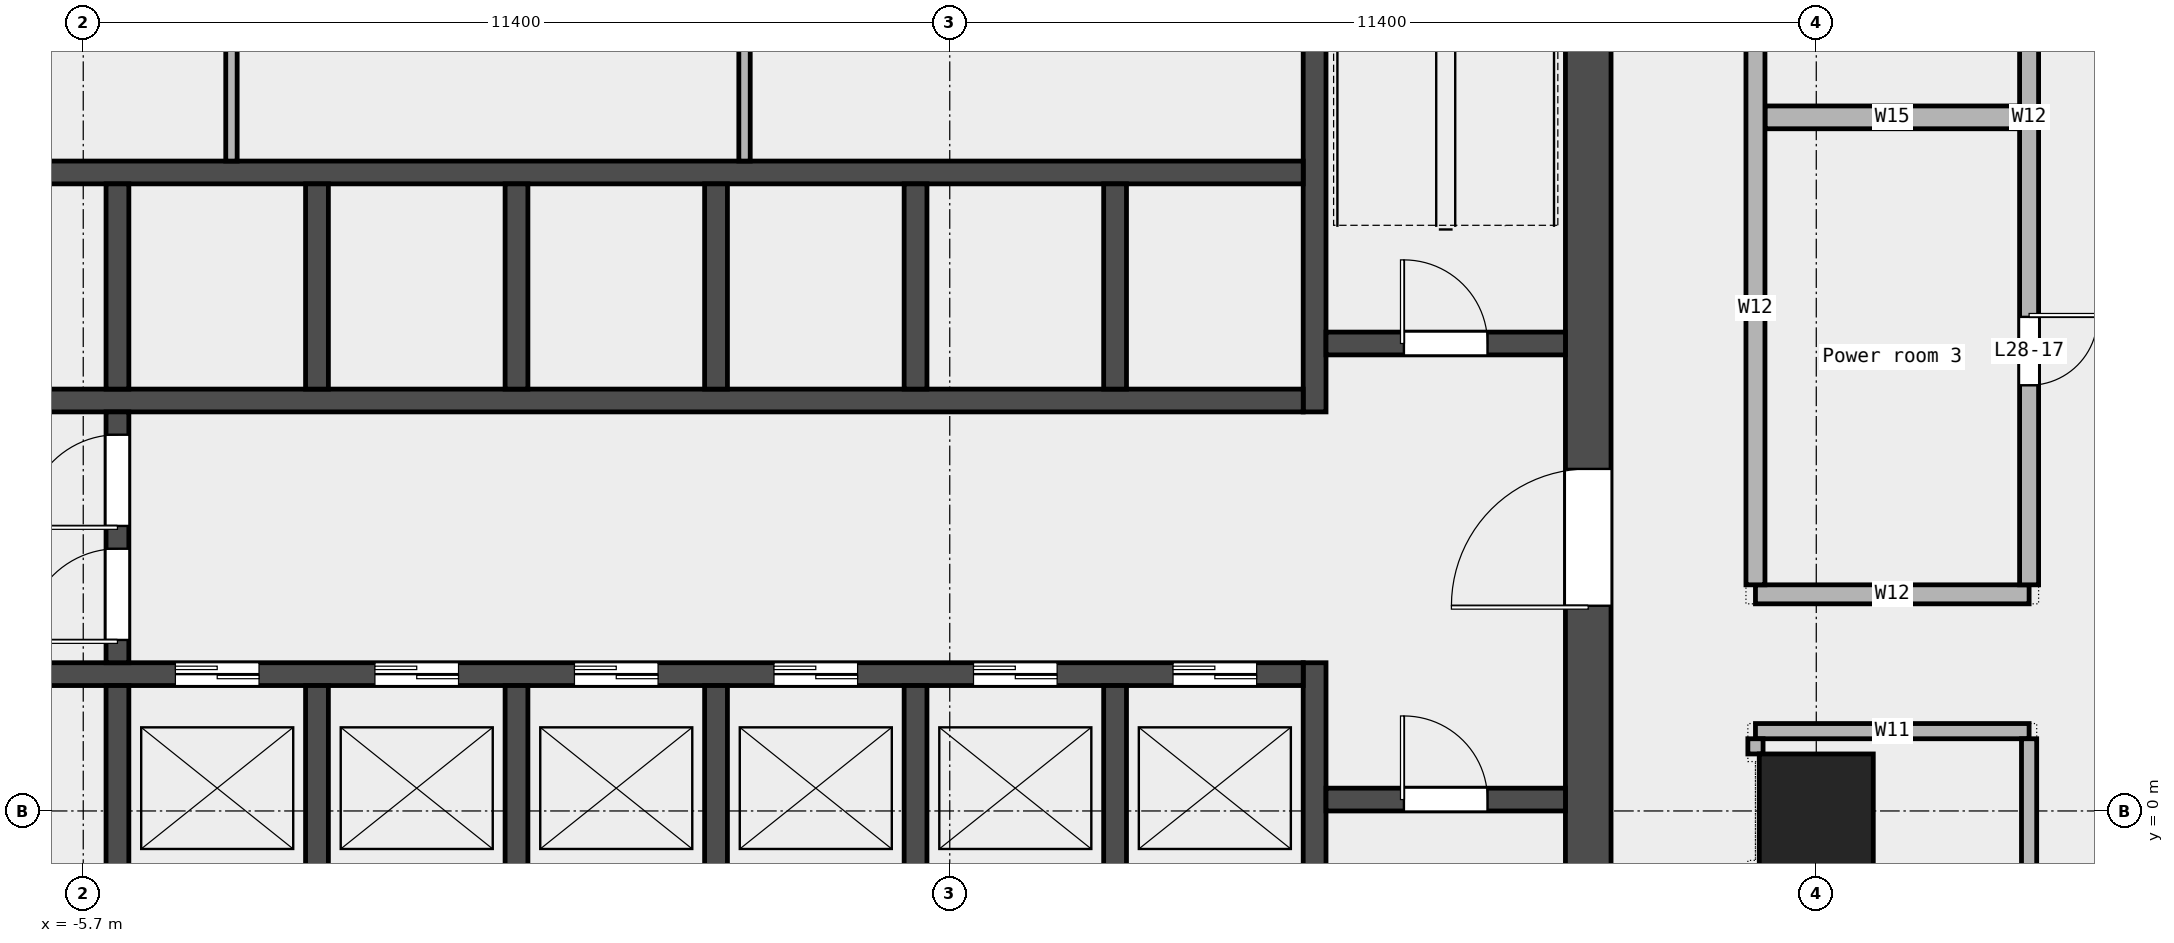
"""IFC4 building model, lengths in metres.
Left out: names, types, materials, properties, quantities, classifications, styles, units other than length and angle.
Written with IfcOpenShell. Run it as: python <this file> out.ifc"""

import sys

from ifc_helpers import new_model, si_unit, direction, frame, frame_2d, origin, origin_2d, place, context, subcontext, project, spatial, rectangle, extrude, element, fill, save


model = new_model("IFC4")
c1 = context("Model", 3, precision=1e-05, world=origin(), true_north=direction((0.0, 1.0)))
c2 = subcontext(c1, "Body", "Model", "MODEL_VIEW")
j1 = project(units=[si_unit("LENGTHUNIT", "METRE"), si_unit("PLANEANGLEUNIT", "RADIAN")], contexts=[c1])
p1 = place(None, origin())
s1 = spatial("IfcSite", under=j1, at=p1, CompositionType="ELEMENT")
p2 = place(p1, origin())
s2 = spatial("IfcBuilding", under=s1, at=p2, CompositionType="ELEMENT")
p3 = place(p2, frame((0.0, 0.0, 139.6)))
s3 = spatial("IfcBuildingStorey", under=s2, at=p3, CompositionType="ELEMENT", Elevation=139.6)
p4 = place(p3, frame((17.1, 0.0, 0.0), z_axis=(0.0, 0.0, 1.0), x_axis=(1.0, 0.0, 0.0)))
e1 = element("IfcColumn", 1, at=p4, inside=s3, PredefinedType="COLUMN", context=c2, shape_type="SweptSolid", body=[
    extrude(rectangle(XDim=1.5, YDim=1.5, at=origin_2d()), origin(), (0.0, 0.0, 1.0), 4.05),
])
p5 = place(p3, frame((16.3, 1.05, 0.0), z_axis=(0.0, 0.0, 1.0), x_axis=(1.0, 0.0, 0.0)))
e2 = element("IfcWall", 2, at=p5, inside=s3, PredefinedType="PARTITIONING", context=c2, shape_type="SweptSolid", body=[
    extrude(rectangle(XDim=3.6, YDim=0.2, at=frame_2d((1.8, 0.0))), origin(), (0.0, 0.0, 1.0), 4.05),
])
p6 = place(p3, frame((16.3, 2.85, 0.0), z_axis=(0.0, 0.0, 1.0), x_axis=(1.0, 0.0, 0.0)))
e3 = element("IfcWall", 3, at=p6, inside=s3, PredefinedType="PARTITIONING", context=c2, shape_type="SweptSolid", body=[
    extrude(rectangle(XDim=3.6, YDim=0.25, at=frame_2d((1.8, 0.0))), origin(), (0.0, 0.0, 1.0), 4.05),
])
p7 = place(p3, frame((16.425, 9.125, 0.0), z_axis=(0.0, 0.0, 1.0), x_axis=(1.0, 0.0, 0.0)))
e4 = element("IfcWall", 4, at=p7, inside=s3, PredefinedType="PARTITIONING", context=c2, shape_type="SweptSolid", body=[
    extrude(rectangle(XDim=3.35, YDim=0.3, at=frame_2d((1.675, 0.0))), origin(), (0.0, 0.0, 1.0), 4.05),
])
p8 = place(p3, frame((16.3, 0.75, 0.0), z_axis=(0.0, 0.0, 1.0), x_axis=(0.0, 1.0, 0.0)))
e5 = element("IfcWall", 5, at=p8, inside=s3, PredefinedType="PARTITIONING", context=c2, shape_type="SweptSolid", body=[
    extrude(rectangle(XDim=0.2, YDim=0.2, at=frame_2d((0.1, 0.0))), origin(), (0.0, 0.0, 1.0), 4.05),
])
p9 = place(p3, frame((16.3, 2.975, 0.0), z_axis=(0.0, 0.0, 1.0), x_axis=(0.0, 1.0, 0.0)))
e6 = element("IfcWall", 6, at=p9, inside=s3, PredefinedType="PARTITIONING", context=c2, shape_type="SweptSolid", body=[
    extrude(rectangle(XDim=7.275, YDim=0.25, at=frame_2d((3.637, 0.0))), origin(), (0.0, 0.0, 1.0), 4.05),
])
p10 = place(p3, frame((19.9, -9.0, 0.0), z_axis=(0.0, 0.0, 1.0), x_axis=(0.0, 1.0, 0.0)))
e7 = element("IfcWall", 7, at=p10, inside=s3, PredefinedType="PARTITIONING", context=c2, shape_type="SweptSolid", body=[
    extrude(rectangle(XDim=9.95, YDim=0.2, at=frame_2d((4.975, 0.0))), origin(), (0.0, 0.0, 1.0), 4.05),
])
p11 = place(p3, frame((19.9, 2.975, 0.0), z_axis=(0.0, 0.0, 1.0), x_axis=(0.0, 1.0, 0.0)))
e8 = element("IfcWall", 8, at=p11, inside=s3, PredefinedType="PARTITIONING", context=c2, shape_type="SweptSolid", body=[
    extrude(rectangle(XDim=12.3, YDim=0.25, at=frame_2d((6.15, 0.0))), origin(), (0.0, 0.0, 1.0), 4.05),
])
p12 = place(p11, frame((8.775, 0.0, 0.0)))
e9 = element("IfcOpeningElement", 9, at=p12, cuts=e8, PredefinedType="OPENING", context=c2, shape_type="SweptSolid", body=[
    extrude(rectangle(XDim=0.9, YDim=2.1, at=frame_2d((0.45, 1.05))), frame((0.0, 0.137, 0.0), z_axis=(0.0, -1.0, 0.0), x_axis=(1.0, 0.0, 0.0)), (0.0, 0.0, 1.0), 0.274),
])
p13 = place(p11, frame((2.625, 0.0, 0.0)))
e10 = element("IfcOpeningElement", 10, at=p13, cuts=e8, PredefinedType="OPENING", context=c2, shape_type="SweptSolid", body=[
    extrude(rectangle(XDim=0.9, YDim=2.1, at=frame_2d((0.45, 1.05))), frame((0.0, 0.137, 0.0), z_axis=(0.0, -1.0, 0.0), x_axis=(1.0, 0.0, 0.0)), (0.0, 0.0, 1.0), 0.274),
])
p14 = place(p3, frame((14.1, -6.6, 0.0), z_axis=(0.0, 0.0, 1.0), x_axis=(0.0, 1.0, 0.0)))
e11 = element("IfcWall", 11, at=p14, inside=s3, PredefinedType="SHEAR", context=c2, shape_type="SweptSolid", body=[
    extrude(rectangle(XDim=19.5, YDim=0.6, at=frame_2d((9.75, 0.0))), origin(), (0.0, 0.0, 1.0), 4.2),
])
p15 = place(p14, frame((9.3, 0.0, 0.0)))
e12 = element("IfcOpeningElement", 12, at=p15, cuts=e11, PredefinedType="OPENING", context=c2, shape_type="SweptSolid", body=[
    extrude(rectangle(XDim=1.8, YDim=2.1, at=frame_2d((0.9, 1.05))), frame((0.0, 0.312, 0.0), z_axis=(0.0, -1.0, 0.0), x_axis=(1.0, 0.0, 0.0)), (0.0, 0.0, 1.0), 0.624),
])
p16 = place(p3, frame((10.5, -6.6, 0.0), z_axis=(0.0, 0.0, 1.0), x_axis=(0.0, 1.0, 0.0)))
e13 = element("IfcWall", 13, at=p16, inside=s3, PredefinedType="SHEAR", context=c2, shape_type="SweptSolid", body=[
    extrude(rectangle(XDim=8.55, YDim=0.3, at=frame_2d((4.275, 0.0))), origin(), (0.0, 0.0, 1.0), 4.2),
])
p17 = place(p3, frame((10.5, 5.25, 0.0), z_axis=(0.0, 0.0, 1.0), x_axis=(0.0, 1.0, 0.0)))
e14 = element("IfcWall", 14, at=p17, inside=s3, PredefinedType="SHEAR", context=c2, shape_type="SweptSolid", body=[
    extrude(rectangle(XDim=7.65, YDim=0.3, at=frame_2d((3.825, 0.0))), origin(), (0.0, 0.0, 1.0), 4.2),
])
p18 = place(p3, frame((10.65, 0.15, 0.0), z_axis=(0.0, 0.0, 1.0), x_axis=(1.0, 0.0, 0.0)))
e15 = element("IfcWall", 15, at=p18, inside=s3, PredefinedType="SOLIDWALL", context=c2, shape_type="SweptSolid", body=[
    extrude(rectangle(XDim=3.15, YDim=0.3, at=frame_2d((1.575, 0.0))), origin(), (0.0, 0.0, 1.0), 4.2),
])
p19 = place(p18, frame((1.025, 0.0, 0.0)))
e16 = element("IfcOpeningElement", 16, at=p19, cuts=e15, PredefinedType="OPENING", context=c2, shape_type="SweptSolid", body=[
    extrude(rectangle(XDim=1.1, YDim=2.1, at=frame_2d((0.55, 1.05))), frame((0.0, 0.162, 0.0), z_axis=(0.0, -1.0, 0.0), x_axis=(1.0, 0.0, 0.0)), (0.0, 0.0, 1.0), 0.324),
])
p20 = place(p3, frame((10.65, 6.15, 0.0), z_axis=(0.0, 0.0, 1.0), x_axis=(1.0, 0.0, 0.0)))
e17 = element("IfcWall", 17, at=p20, inside=s3, PredefinedType="SOLIDWALL", context=c2, shape_type="SweptSolid", body=[
    extrude(rectangle(XDim=3.15, YDim=0.3, at=frame_2d((1.575, 0.0))), origin(), (0.0, 0.0, 1.0), 4.2),
])
p21 = place(p20, frame((1.025, 0.0, 0.0)))
e18 = element("IfcOpeningElement", 18, at=p21, cuts=e17, PredefinedType="OPENING", context=c2, shape_type="SweptSolid", body=[
    extrude(rectangle(XDim=1.1, YDim=2.1, at=frame_2d((0.55, 1.05))), frame((0.0, 0.162, 0.0), z_axis=(0.0, -1.0, 0.0), x_axis=(1.0, 0.0, 0.0)), (0.0, 0.0, 1.0), 0.324),
])
p22 = place(p3, frame((-10.35, 1.8, 0.0), z_axis=(0.0, 0.0, 1.0), x_axis=(1.0, 0.0, 0.0)))
e19 = element("IfcWall", 19, at=p22, inside=s3, PredefinedType="SOLIDWALL", context=c2, shape_type="SweptSolid", body=[
    extrude(rectangle(XDim=20.7, YDim=0.3, at=frame_2d((10.35, 0.0))), origin(), (0.0, 0.0, 1.0), 4.2),
])
p23 = place(p22, frame((0.512, 0.0, 0.0)))
e20 = element("IfcOpeningElement", 20, at=p23, cuts=e19, PredefinedType="OPENING", context=c2, shape_type="SweptSolid", body=[
    extrude(rectangle(XDim=1.3, YDim=2.1, at=frame_2d((0.65, 1.05))), frame((0.0, 0.162, 0.0), z_axis=(0.0, -1.0, 0.0), x_axis=(1.0, 0.0, 0.0)), (0.0, 0.0, 1.0), 0.324),
])
p24 = place(p22, frame((5.863, 0.0, 0.0)))
e21 = element("IfcOpeningElement", 21, at=p24, cuts=e19, PredefinedType="OPENING", context=c2, shape_type="SweptSolid", body=[
    extrude(rectangle(XDim=1.1, YDim=2.1, at=frame_2d((0.55, 1.05))), frame((0.0, 0.162, 0.0), z_axis=(0.0, -1.0, 0.0), x_axis=(1.0, 0.0, 0.0)), (0.0, 0.0, 1.0), 0.324),
])
p25 = place(p22, frame((8.488, 0.0, 0.0)))
e22 = element("IfcOpeningElement", 22, at=p25, cuts=e19, PredefinedType="OPENING", context=c2, shape_type="SweptSolid", body=[
    extrude(rectangle(XDim=1.1, YDim=2.1, at=frame_2d((0.55, 1.05))), frame((0.0, 0.162, 0.0), z_axis=(0.0, -1.0, 0.0), x_axis=(1.0, 0.0, 0.0)), (0.0, 0.0, 1.0), 0.324),
])
p26 = place(p22, frame((11.113, 0.0, 0.0)))
e23 = element("IfcOpeningElement", 23, at=p26, cuts=e19, PredefinedType="OPENING", context=c2, shape_type="SweptSolid", body=[
    extrude(rectangle(XDim=1.1, YDim=2.1, at=frame_2d((0.55, 1.05))), frame((0.0, 0.162, 0.0), z_axis=(0.0, -1.0, 0.0), x_axis=(1.0, 0.0, 0.0)), (0.0, 0.0, 1.0), 0.324),
])
p27 = place(p22, frame((13.738, 0.0, 0.0)))
e24 = element("IfcOpeningElement", 24, at=p27, cuts=e19, PredefinedType="OPENING", context=c2, shape_type="SweptSolid", body=[
    extrude(rectangle(XDim=1.1, YDim=2.1, at=frame_2d((0.55, 1.05))), frame((0.0, 0.162, 0.0), z_axis=(0.0, -1.0, 0.0), x_axis=(1.0, 0.0, 0.0)), (0.0, 0.0, 1.0), 0.324),
])
p28 = place(p22, frame((16.363, 0.0, 0.0)))
e25 = element("IfcOpeningElement", 25, at=p28, cuts=e19, PredefinedType="OPENING", context=c2, shape_type="SweptSolid", body=[
    extrude(rectangle(XDim=1.1, YDim=2.1, at=frame_2d((0.55, 1.05))), frame((0.0, 0.162, 0.0), z_axis=(0.0, -1.0, 0.0), x_axis=(1.0, 0.0, 0.0)), (0.0, 0.0, 1.0), 0.324),
])
p29 = place(p22, frame((18.988, 0.0, 0.0)))
e26 = element("IfcOpeningElement", 26, at=p29, cuts=e19, PredefinedType="OPENING", context=c2, shape_type="SweptSolid", body=[
    extrude(rectangle(XDim=1.1, YDim=2.1, at=frame_2d((0.55, 1.05))), frame((0.0, 0.162, 0.0), z_axis=(0.0, -1.0, 0.0), x_axis=(1.0, 0.0, 0.0)), (0.0, 0.0, 1.0), 0.324),
])
p30 = place(p3, frame((-10.35, 5.4, 0.0), z_axis=(0.0, 0.0, 1.0), x_axis=(1.0, 0.0, 0.0)))
e27 = element("IfcWall", 27, at=p30, inside=s3, PredefinedType="SOLIDWALL", context=c2, shape_type="SweptSolid", body=[
    extrude(rectangle(XDim=20.7, YDim=0.3, at=frame_2d((10.35, 0.0))), origin(), (0.0, 0.0, 1.0), 4.2),
])
p31 = place(p30, frame((0.512, 0.0, 0.0)))
e28 = element("IfcOpeningElement", 28, at=p31, cuts=e27, PredefinedType="OPENING", context=c2, shape_type="SweptSolid", body=[
    extrude(rectangle(XDim=1.3, YDim=2.1, at=frame_2d((0.65, 1.05))), frame((0.0, 0.162, 0.0), z_axis=(0.0, -1.0, 0.0), x_axis=(1.0, 0.0, 0.0)), (0.0, 0.0, 1.0), 0.324),
])
p32 = place(p3, frame((-10.35, 8.4, 0.0), z_axis=(0.0, 0.0, 1.0), x_axis=(1.0, 0.0, 0.0)))
e29 = element("IfcWall", 29, at=p32, inside=s3, PredefinedType="SOLIDWALL", context=c2, shape_type="SweptSolid", body=[
    extrude(rectangle(XDim=20.7, YDim=0.3, at=frame_2d((10.35, 0.0))), origin(), (0.0, 0.0, 1.0), 4.2),
])
for number, where, z_axis, x_axis in (
    (30, (-5.25, -1.05, 0.0), (0.0, 0.0, 1.0), (0.0, 1.0, 0.0)),
    (31, (-2.625, -1.05, 0.0), (0.0, 0.0, 1.0), (0.0, 1.0, 0.0)),
    (32, (0.0, -1.05, 0.0), (0.0, 0.0, 1.0), (0.0, 1.0, 0.0)),
    (33, (2.625, -1.05, 0.0), (0.0, 0.0, 1.0), (0.0, 1.0, 0.0)),
    (34, (5.25, -1.05, 0.0), (0.0, 0.0, 1.0), (0.0, 1.0, 0.0)),
    (35, (7.875, -1.05, 0.0), (0.0, 0.0, 1.0), (0.0, 1.0, 0.0)),
    (36, (-5.25, 5.55, 0.0), (0.0, 0.0, 1.0), (0.0, 1.0, 0.0)),
    (37, (-2.625, 5.55, 0.0), (0.0, 0.0, 1.0), (0.0, 1.0, 0.0)),
    (38, (0.0, 5.55, 0.0), (0.0, 0.0, 1.0), (0.0, 1.0, 0.0)),
    (39, (2.625, 5.55, 0.0), (0.0, 0.0, 1.0), (0.0, 1.0, 0.0)),
    (40, (5.25, 5.55, 0.0), (0.0, 0.0, 1.0), (0.0, 1.0, 0.0)),
    (41, (7.875, 5.55, 0.0), (0.0, 0.0, 1.0), (0.0, 1.0, 0.0)),
):
    element("IfcWall", number, at=place(p3, frame(where, z_axis=z_axis, x_axis=x_axis)), inside=s3, PredefinedType="SOLIDWALL", context=c2, shape_type="SweptSolid", body=[
        extrude(rectangle(XDim=2.7, YDim=0.3, at=frame_2d((1.35, 0.0))), origin(), (0.0, 0.0, 1.0), 4.2),
    ])
p33 = place(p3, frame((-5.25, 1.95, 0.0), z_axis=(0.0, 0.0, 1.0), x_axis=(0.0, 1.0, 0.0)))
e42 = element("IfcWall", 42, at=p33, inside=s3, PredefinedType="SOLIDWALL", context=c2, shape_type="SweptSolid", body=[
    extrude(rectangle(XDim=3.3, YDim=0.3, at=frame_2d((1.65, 0.0))), origin(), (0.0, 0.0, 1.0), 4.2),
])
p34 = place(p33, frame((0.3, 0.0, 0.0)))
e43 = element("IfcOpeningElement", 43, at=p34, cuts=e42, PredefinedType="OPENING", context=c2, shape_type="SweptSolid", body=[
    extrude(rectangle(XDim=1.2, YDim=2.1, at=frame_2d((0.6, 1.05))), frame((0.0, 0.162, 0.0), z_axis=(0.0, -1.0, 0.0), x_axis=(1.0, 0.0, 0.0)), (0.0, 0.0, 1.0), 0.324),
])
p35 = place(p33, frame((1.8, 0.0, 0.0)))
e44 = element("IfcOpeningElement", 44, at=p35, cuts=e42, PredefinedType="OPENING", context=c2, shape_type="SweptSolid", body=[
    extrude(rectangle(XDim=1.2, YDim=2.1, at=frame_2d((0.6, 1.05))), frame((0.0, 0.162, 0.0), z_axis=(0.0, -1.0, 0.0), x_axis=(1.0, 0.0, 0.0)), (0.0, 0.0, 1.0), 0.324),
])
for number, where, z_axis, x_axis in (
    (45, (-3.75, 8.55, 0.0), (0.0, 0.0, 1.0), (0.0, 1.0, 0.0)),
    (46, (3.0, 8.55, 0.0), (0.0, 0.0, 1.0), (0.0, 1.0, 0.0)),
):
    element("IfcWall", number, at=place(p3, frame(where, z_axis=z_axis, x_axis=x_axis)), inside=s3, PredefinedType="PARTITIONING", context=c2, shape_type="SweptSolid", body=[
        extrude(rectangle(XDim=4.35, YDim=0.15, at=frame_2d((2.175, 0.0))), origin(), (0.0, 0.0, 1.0), 4.2),
    ])
p36 = place(p13, origin())
e47 = element("IfcDoor", 47, at=p36, inside=s3, OperationType="SINGLE_SWING_LEFT", PredefinedType="DOOR", context=c2, shape_type="SweptSolid", body=[
    extrude(rectangle(XDim=0.9, YDim=2.1, at=frame_2d((0.45, 1.05))), frame((0.0, 0.025, 0.0), z_axis=(0.0, -1.0, 0.0), x_axis=(1.0, 0.0, 0.0)), (0.0, 0.0, 1.0), 0.05),
])
fill(e10, e47)
p37 = place(p19, origin())
e48 = element("IfcDoor", 48, at=p37, inside=s3, OperationType="SINGLE_SWING_RIGHT", PredefinedType="DOOR", context=c2, shape_type="SweptSolid", body=[
    extrude(rectangle(XDim=1.1, YDim=2.1, at=frame_2d((0.55, 1.05))), frame((0.0, 0.025, 0.0), z_axis=(0.0, -1.0, 0.0), x_axis=(1.0, 0.0, 0.0)), (0.0, 0.0, 1.0), 0.05),
])
fill(e16, e48)
p38 = place(p21, origin())
e49 = element("IfcDoor", 49, at=p38, inside=s3, OperationType="SINGLE_SWING_RIGHT", PredefinedType="DOOR", context=c2, shape_type="SweptSolid", body=[
    extrude(rectangle(XDim=1.1, YDim=2.1, at=frame_2d((0.55, 1.05))), frame((0.0, 0.025, 0.0), z_axis=(0.0, -1.0, 0.0), x_axis=(1.0, 0.0, 0.0)), (0.0, 0.0, 1.0), 0.05),
])
fill(e18, e49)
p39 = place(p15, origin())
e50 = element("IfcDoor", 50, at=p39, inside=s3, OperationType="DOUBLE_DOOR_SINGLE_SWING", PredefinedType="DOOR", context=c2, shape_type="SweptSolid", body=[
    extrude(rectangle(XDim=1.8, YDim=2.1, at=frame_2d((0.9, 1.05))), frame((0.0, 0.025, 0.0), z_axis=(0.0, -1.0, 0.0), x_axis=(1.0, 0.0, 0.0)), (0.0, 0.0, 1.0), 0.05),
])
fill(e12, e50)
p40 = place(p34, origin())
e51 = element("IfcDoor", 51, at=p40, inside=s3, OperationType="SINGLE_SWING_LEFT", PredefinedType="DOOR", context=c2, shape_type="SweptSolid", body=[
    extrude(rectangle(XDim=1.2, YDim=2.1, at=frame_2d((0.6, 1.05))), frame((0.0, 0.025, 0.0), z_axis=(0.0, -1.0, 0.0), x_axis=(1.0, 0.0, 0.0)), (0.0, 0.0, 1.0), 0.05),
])
fill(e43, e51)
p41 = place(p35, origin())
e52 = element("IfcDoor", 52, at=p41, inside=s3, OperationType="SINGLE_SWING_RIGHT", PredefinedType="DOOR", context=c2, shape_type="SweptSolid", body=[
    extrude(rectangle(XDim=1.2, YDim=2.1, at=frame_2d((0.6, 1.05))), frame((0.0, 0.025, 0.0), z_axis=(0.0, -1.0, 0.0), x_axis=(1.0, 0.0, 0.0)), (0.0, 0.0, 1.0), 0.05),
])
fill(e44, e52)
p42 = place(p24, origin())
e53 = element("IfcDoor", 53, at=p42, inside=s3, OperationType="DOUBLE_DOOR_SLIDING", PredefinedType="DOOR", context=c2, shape_type="SweptSolid", body=[
    extrude(rectangle(XDim=1.1, YDim=2.1, at=frame_2d((0.55, 1.05))), frame((0.0, 0.025, 0.0), z_axis=(0.0, -1.0, 0.0), x_axis=(1.0, 0.0, 0.0)), (0.0, 0.0, 1.0), 0.05),
])
fill(e21, e53)
p43 = place(p25, origin())
e54 = element("IfcDoor", 54, at=p43, inside=s3, OperationType="DOUBLE_DOOR_SLIDING", PredefinedType="DOOR", context=c2, shape_type="SweptSolid", body=[
    extrude(rectangle(XDim=1.1, YDim=2.1, at=frame_2d((0.55, 1.05))), frame((0.0, 0.025, 0.0), z_axis=(0.0, -1.0, 0.0), x_axis=(1.0, 0.0, 0.0)), (0.0, 0.0, 1.0), 0.05),
])
fill(e22, e54)
p44 = place(p26, origin())
e55 = element("IfcDoor", 55, at=p44, inside=s3, OperationType="DOUBLE_DOOR_SLIDING", PredefinedType="DOOR", context=c2, shape_type="SweptSolid", body=[
    extrude(rectangle(XDim=1.1, YDim=2.1, at=frame_2d((0.55, 1.05))), frame((0.0, 0.025, 0.0), z_axis=(0.0, -1.0, 0.0), x_axis=(1.0, 0.0, 0.0)), (0.0, 0.0, 1.0), 0.05),
])
fill(e23, e55)
p45 = place(p27, origin())
e56 = element("IfcDoor", 56, at=p45, inside=s3, OperationType="DOUBLE_DOOR_SLIDING", PredefinedType="DOOR", context=c2, shape_type="SweptSolid", body=[
    extrude(rectangle(XDim=1.1, YDim=2.1, at=frame_2d((0.55, 1.05))), frame((0.0, 0.025, 0.0), z_axis=(0.0, -1.0, 0.0), x_axis=(1.0, 0.0, 0.0)), (0.0, 0.0, 1.0), 0.05),
])
fill(e24, e56)
p46 = place(p28, origin())
e57 = element("IfcDoor", 57, at=p46, inside=s3, OperationType="DOUBLE_DOOR_SLIDING", PredefinedType="DOOR", context=c2, shape_type="SweptSolid", body=[
    extrude(rectangle(XDim=1.1, YDim=2.1, at=frame_2d((0.55, 1.05))), frame((0.0, 0.025, 0.0), z_axis=(0.0, -1.0, 0.0), x_axis=(1.0, 0.0, 0.0)), (0.0, 0.0, 1.0), 0.05),
])
fill(e25, e57)
p47 = place(p29, origin())
e58 = element("IfcDoor", 58, at=p47, inside=s3, OperationType="DOUBLE_DOOR_SLIDING", PredefinedType="DOOR", context=c2, shape_type="SweptSolid", body=[
    extrude(rectangle(XDim=1.1, YDim=2.1, at=frame_2d((0.55, 1.05))), frame((0.0, 0.025, 0.0), z_axis=(0.0, -1.0, 0.0), x_axis=(1.0, 0.0, 0.0)), (0.0, 0.0, 1.0), 0.05),
])
fill(e26, e58)
save(model, sys.argv[1])
